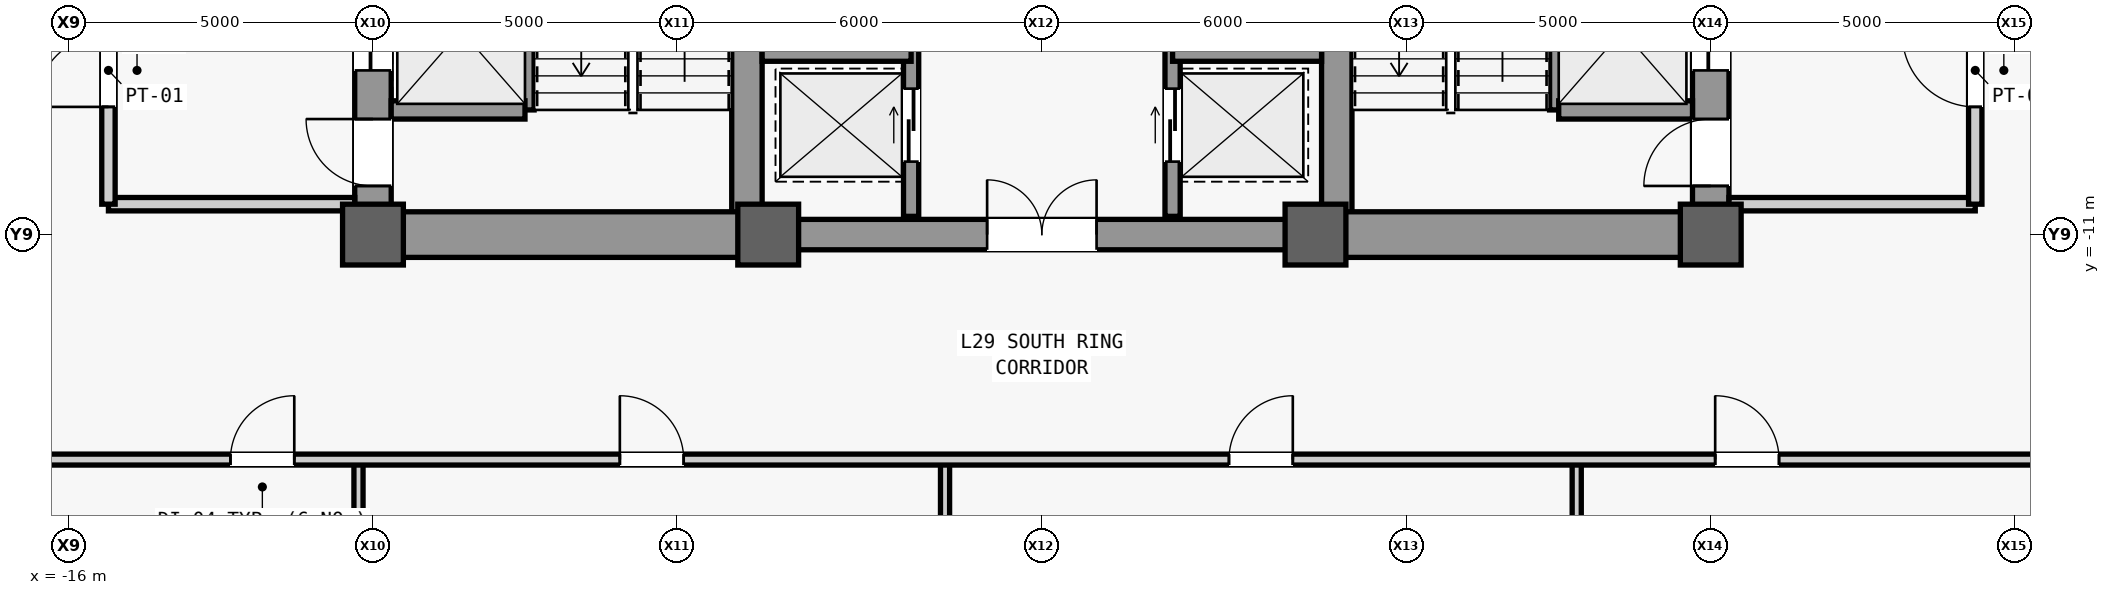
"""IFC4 building model, lengths in metres.
Left out: names, types, materials, properties, quantities, classifications, styles, units other than length and angle.
Written with IfcOpenShell. Run it as: python <this file> out.ifc"""

import sys

from ifc_helpers import new_model, si_unit, direction, frame, frame_2d, origin, origin_2d, place, context, subcontext, project, spatial, rectangle, extrude, source, transform, mapped, element, fill, save


model = new_model("IFC4")
c1 = context("Model", 3, precision=1e-05, world=origin(), true_north=direction((0.0, 1.0)))
c2 = subcontext(c1, "Body", "Model", "MODEL_VIEW")
j1 = project(units=[si_unit("LENGTHUNIT", "METRE"), si_unit("PLANEANGLEUNIT", "RADIAN")], contexts=[c1])
p1 = place(None, origin())
s1 = spatial("IfcSite", under=j1, at=p1, CompositionType="ELEMENT")
p2 = place(p1, origin())
s2 = spatial("IfcBuilding", under=s1, at=p2, CompositionType="ELEMENT")
p3 = place(p2, frame((0.0, 0.0, 128.3)))
s3 = spatial("IfcBuildingStorey", under=s2, at=p3, CompositionType="ELEMENT", Elevation=128.3)
m1 = source(origin(), c2, "Body", "SweptSolid", [
    extrude(rectangle(XDim=22.0, YDim=0.6, at=frame_2d((11.0, 0.0))), origin(), (0.0, 0.0, 1.0), 3.84),
])
p4 = place(p3, frame((-11.0, -11.0, 0.0), z_axis=(0.0, 0.0, 1.0), x_axis=(0.0, 1.0, 0.0)))
e1 = element("IfcWall", 1, at=p4, inside=s3, PredefinedType="SHEAR", context=c2, shape_type="MappedRepresentation", body=[
    mapped(m1, transform((0.0, 0.0, 0.0), scale=1.0)),
])
m2 = source(origin(), c2, "Body", "SweptSolid", [
    extrude(rectangle(XDim=1.1, YDim=2.2, at=frame_2d((0.55, 1.1))), frame((0.0, 0.31, 0.0), z_axis=(0.0, -1.0, 0.0), x_axis=(1.0, 0.0, 0.0)), (0.0, 0.0, 1.0), 0.62),
])
p5 = place(p4, frame((0.8, 0.0, 0.0)))
e2 = element("IfcOpeningElement", 2, at=p5, cuts=e1, PredefinedType="OPENING", context=c2, shape_type="MappedRepresentation", body=[
    mapped(m2, transform((0.0, 0.0, 0.0), scale=1.0)),
])
p6 = place(p4, frame((12.5, 0.0, 0.0)))
e3 = element("IfcOpeningElement", 3, at=p6, cuts=e1, PredefinedType="OPENING", context=c2, shape_type="MappedRepresentation", body=[
    mapped(m2, transform((0.0, 0.0, 0.0), scale=1.0)),
])
m3 = source(origin(), c2, "Body", "SweptSolid", [
    extrude(rectangle(XDim=0.9, YDim=2.15, at=frame_2d((0.45, 1.075))), frame((0.0, 0.31, 0.0), z_axis=(0.0, -1.0, 0.0), x_axis=(1.0, 0.0, 0.0)), (0.0, 0.0, 1.0), 0.62),
])
p7 = place(p4, frame((6.85, 0.0, 0.0)))
e4 = element("IfcOpeningElement", 4, at=p7, cuts=e1, PredefinedType="OPENING", context=c2, shape_type="MappedRepresentation", body=[
    mapped(m3, transform((0.0, 0.0, 0.0), scale=1.0)),
])
m4 = source(origin(), c2, "Body", "SweptSolid", [
    extrude(rectangle(XDim=1.3, YDim=2.3, at=frame_2d((0.65, 1.15))), frame((0.0, 0.31, 0.0), z_axis=(0.0, -1.0, 0.0), x_axis=(1.0, 0.0, 0.0)), (0.0, 0.0, 1.0), 0.62),
])
p8 = place(p4, frame((2.7, 0.0, 0.0)))
e5 = element("IfcOpeningElement", 5, at=p8, cuts=e1, PredefinedType="OPENING", context=c2, shape_type="MappedRepresentation", body=[
    mapped(m4, transform((0.0, 0.0, 0.0), scale=1.0)),
])
p9 = place(p3, frame((11.0, -11.0, 0.0), z_axis=(0.0, 0.0, 1.0), x_axis=(0.0, 1.0, 0.0)))
e6 = element("IfcWall", 6, at=p9, inside=s3, PredefinedType="SHEAR", context=c2, shape_type="MappedRepresentation", body=[
    mapped(m1, transform((0.0, 0.0, 0.0), scale=1.0)),
])
p10 = place(p9, frame((0.8, 0.0, 0.0)))
e7 = element("IfcOpeningElement", 7, at=p10, cuts=e6, PredefinedType="OPENING", context=c2, shape_type="MappedRepresentation", body=[
    mapped(m2, transform((0.0, 0.0, 0.0), scale=1.0)),
])
p11 = place(p9, frame((6.2, 0.0, 0.0)))
e8 = element("IfcOpeningElement", 8, at=p11, cuts=e6, PredefinedType="OPENING", context=c2, shape_type="MappedRepresentation", body=[
    mapped(m3, transform((0.0, 0.0, 0.0), scale=1.0)),
])
p12 = place(p9, frame((8.05, 0.0, 0.0)))
e9 = element("IfcOpeningElement", 9, at=p12, cuts=e6, PredefinedType="OPENING", context=c2, shape_type="MappedRepresentation", body=[
    mapped(m3, transform((0.0, 0.0, 0.0), scale=1.0)),
])
p13 = place(p9, frame((2.7, 0.0, 0.0)))
e10 = element("IfcOpeningElement", 10, at=p13, cuts=e6, PredefinedType="OPENING", context=c2, shape_type="MappedRepresentation", body=[
    mapped(m4, transform((0.0, 0.0, 0.0), scale=1.0)),
])
p14 = place(p9, frame((13.35, 0.0, 0.0)))
e11 = element("IfcOpeningElement", 11, at=p14, cuts=e6, PredefinedType="OPENING", context=c2, shape_type="MappedRepresentation", body=[
    mapped(m4, transform((0.0, 0.0, 0.0), scale=1.0)),
])
m5 = source(origin(), c2, "Body", "SweptSolid", [
    extrude(rectangle(XDim=21.4, YDim=0.5, at=frame_2d((10.7, 0.0))), origin(), (0.0, 0.0, 1.0), 3.84),
])
for number, where, z_axis, x_axis in (
    (12, (-4.85, -10.7, 0.0), (0.0, 0.0, 1.0), (0.0, 1.0, 0.0)),
    (13, (4.85, -10.7, 0.0), (0.0, 0.0, 1.0), (0.0, 1.0, 0.0)),
):
    element("IfcWall", number, at=place(p3, frame(where, z_axis=z_axis, x_axis=x_axis)), inside=s3, PredefinedType="SHEAR", context=c2, shape_type="MappedRepresentation", body=[
        mapped(m5, transform((0.0, 0.0, 0.0), scale=1.0)),
    ])
m6 = source(origin(), c2, "Body", "SweptSolid", [
    extrude(rectangle(XDim=5.85, YDim=0.75, at=frame_2d((2.925, 0.0))), origin(), (0.0, 0.0, 1.0), 3.84),
])
for number, where, z_axis, x_axis in (
    (14, (-10.7, -11.0, 0.0), (0.0, 0.0, 1.0), (1.0, 0.0, 0.0)),
    (15, (4.85, -11.0, 0.0), (0.0, 0.0, 1.0), (1.0, 0.0, 0.0)),
):
    element("IfcWall", number, at=place(p3, frame(where, z_axis=z_axis, x_axis=x_axis)), inside=s3, PredefinedType="SHEAR", context=c2, shape_type="MappedRepresentation", body=[
        mapped(m6, transform((0.0, 0.0, 0.0), scale=1.0)),
    ])
m7 = source(origin(), c2, "Body", "SweptSolid", [
    extrude(rectangle(XDim=9.2, YDim=0.5, at=frame_2d((4.6, 0.0))), origin(), (0.0, 0.0, 1.0), 3.84),
])
p15 = place(p3, frame((-4.6, -11.0, 0.0), z_axis=(0.0, 0.0, 1.0), x_axis=(1.0, 0.0, 0.0)))
e16 = element("IfcWall", 16, at=p15, inside=s3, PredefinedType="SHEAR", context=c2, shape_type="MappedRepresentation", body=[
    mapped(m7, transform((0.0, 0.0, 0.0), scale=1.0)),
])
m8 = source(origin(), c2, "Body", "SweptSolid", [
    extrude(rectangle(XDim=1.8, YDim=2.25, at=frame_2d((0.9, 1.125))), frame((0.0, 0.26, 0.0), z_axis=(0.0, -1.0, 0.0), x_axis=(1.0, 0.0, 0.0)), (0.0, 0.0, 1.0), 0.52),
])
p16 = place(p15, frame((3.7, 0.0, 0.0)))
e17 = element("IfcOpeningElement", 17, at=p16, cuts=e16, PredefinedType="OPENING", context=c2, shape_type="MappedRepresentation", body=[
    mapped(m8, transform((0.0, 0.0, 0.0), scale=1.0)),
])
m9 = source(origin(), c2, "Body", "SweptSolid", [
    extrude(rectangle(XDim=1.0, YDim=1.0, at=origin_2d()), origin(), (0.0, 0.0, 1.0), 4.1),
])
for number, where, z_axis, x_axis in (
    (18, (-11.0, -11.0, 0.0), (0.0, 0.0, 1.0), (1.0, 0.0, 0.0)),
    (19, (-4.5, -11.0, 0.0), (0.0, 0.0, 1.0), (1.0, 0.0, 0.0)),
    (20, (4.5, -11.0, 0.0), (0.0, 0.0, 1.0), (1.0, 0.0, 0.0)),
    (21, (11.0, -11.0, 0.0), (0.0, 0.0, 1.0), (1.0, 0.0, 0.0)),
):
    element("IfcColumn", number, at=place(p3, frame(where, z_axis=z_axis, x_axis=x_axis)), inside=s3, PredefinedType="COLUMN", context=c2, shape_type="MappedRepresentation", body=[
        mapped(m9, transform((0.0, 0.0, 0.0), scale=1.0)),
    ])
m10 = source(origin(), c2, "Body", "SweptSolid", [
    extrude(rectangle(XDim=7.8, YDim=0.3, at=frame_2d((3.9, 0.0))), origin(), (0.0, 0.0, 1.0), 3.84),
])
p17 = place(p3, frame((-8.5, -8.95, 0.0), z_axis=(0.0, 0.0, 1.0), x_axis=(0.0, 1.0, 0.0)))
e22 = element("IfcWall", 22, at=p17, inside=s3, PredefinedType="SHEAR", context=c2, shape_type="MappedRepresentation", body=[
    mapped(m10, transform((0.0, 0.0, 0.0), scale=1.0)),
])
m11 = source(origin(), c2, "Body", "SweptSolid", [
    extrude(rectangle(XDim=2.2, YDim=0.3, at=frame_2d((1.1, 0.0))), origin(), (0.0, 0.0, 1.0), 3.84),
])
p18 = place(p3, frame((-10.7, -8.95, 0.0), z_axis=(0.0, 0.0, 1.0), x_axis=(1.0, 0.0, 0.0)))
e23 = element("IfcWall", 23, at=p18, inside=s3, PredefinedType="SHEAR", context=c2, shape_type="MappedRepresentation", body=[
    mapped(m11, transform((0.0, 0.0, 0.0), scale=1.0)),
])
p19 = place(p3, frame((8.5, -8.95, 0.0), z_axis=(0.0, 0.0, 1.0), x_axis=(0.0, 1.0, 0.0)))
e24 = element("IfcWall", 24, at=p19, inside=s3, PredefinedType="SHEAR", context=c2, shape_type="MappedRepresentation", body=[
    mapped(m10, transform((0.0, 0.0, 0.0), scale=1.0)),
])
p20 = place(p3, frame((8.5, -8.95, 0.0), z_axis=(0.0, 0.0, 1.0), x_axis=(1.0, 0.0, 0.0)))
e25 = element("IfcWall", 25, at=p20, inside=s3, PredefinedType="SHEAR", context=c2, shape_type="MappedRepresentation", body=[
    mapped(m11, transform((0.0, 0.0, 0.0), scale=1.0)),
])
m12 = source(origin(), c2, "Body", "SweptSolid", [
    extrude(rectangle(XDim=4.05, YDim=0.22, at=frame_2d((2.025, 0.0))), origin(), (0.0, 0.0, 1.0), 3.84),
])
p21 = place(p3, frame((-15.35, -10.5, 0.0), z_axis=(0.0, 0.0, 1.0), x_axis=(1.0, 0.0, 0.0)))
e26 = element("IfcWall", 26, at=p21, inside=s3, PredefinedType="PARTITIONING", context=c2, shape_type="MappedRepresentation", body=[
    mapped(m12, transform((0.0, 0.0, 0.0), scale=1.0)),
])
m13 = source(origin(), c2, "Body", "SweptSolid", [
    extrude(rectangle(XDim=4.4, YDim=0.22, at=frame_2d((2.2, 0.0))), origin(), (0.0, 0.0, 1.0), 3.84),
])
p22 = place(p3, frame((-15.35, -10.5, 0.0), z_axis=(0.0, 0.0, 1.0), x_axis=(0.0, 1.0, 0.0)))
e27 = element("IfcWall", 27, at=p22, inside=s3, PredefinedType="PARTITIONING", context=c2, shape_type="MappedRepresentation", body=[
    mapped(m13, transform((0.0, 0.0, 0.0), scale=1.0)),
])
m14 = source(origin(), c2, "Body", "SweptSolid", [
    extrude(rectangle(XDim=1.2, YDim=2.2, at=frame_2d((0.6, 1.1))), frame((0.0, 0.12, 0.0), z_axis=(0.0, -1.0, 0.0), x_axis=(1.0, 0.0, 0.0)), (0.0, 0.0, 1.0), 0.24),
])
p23 = place(p22, frame((1.6, 0.0, 0.0)))
e28 = element("IfcOpeningElement", 28, at=p23, cuts=e27, PredefinedType="OPENING", context=c2, shape_type="MappedRepresentation", body=[
    mapped(m14, transform((0.0, 0.0, 0.0), scale=1.0)),
])
p24 = place(p3, frame((11.3, -10.5, 0.0), z_axis=(0.0, 0.0, 1.0), x_axis=(1.0, 0.0, 0.0)))
e29 = element("IfcWall", 29, at=p24, inside=s3, PredefinedType="PARTITIONING", context=c2, shape_type="MappedRepresentation", body=[
    mapped(m12, transform((0.0, 0.0, 0.0), scale=1.0)),
])
p25 = place(p3, frame((15.35, -10.5, 0.0), z_axis=(0.0, 0.0, 1.0), x_axis=(0.0, 1.0, 0.0)))
e30 = element("IfcWall", 30, at=p25, inside=s3, PredefinedType="PARTITIONING", context=c2, shape_type="MappedRepresentation", body=[
    mapped(m13, transform((0.0, 0.0, 0.0), scale=1.0)),
])
p26 = place(p25, frame((1.6, 0.0, 0.0)))
e31 = element("IfcOpeningElement", 31, at=p26, cuts=e30, PredefinedType="OPENING", context=c2, shape_type="MappedRepresentation", body=[
    mapped(m14, transform((0.0, 0.0, 0.0), scale=1.0)),
])
m15 = source(origin(), c2, "Body", "SweptSolid", [
    extrude(rectangle(XDim=5.4, YDim=0.25, at=frame_2d((2.7, 0.0))), origin(), (0.0, 0.0, 1.0), 3.84),
])
p27 = place(p3, frame((-2.15, -10.7, 0.0), z_axis=(0.0, 0.0, 1.0), x_axis=(0.0, 1.0, 0.0)))
e32 = element("IfcWall", 32, at=p27, inside=s3, PredefinedType="SHEAR", context=c2, shape_type="MappedRepresentation", body=[
    mapped(m15, transform((0.0, 0.0, 0.0), scale=1.0)),
])
m16 = source(origin(), c2, "Body", "SweptSolid", [
    extrude(rectangle(XDim=1.2, YDim=2.3, at=frame_2d((0.6, 1.15))), frame((0.0, 0.135, 0.0), z_axis=(0.0, -1.0, 0.0), x_axis=(1.0, 0.0, 0.0)), (0.0, 0.0, 1.0), 0.27),
])
p28 = place(p27, frame((0.9, 0.0, 0.0)))
e33 = element("IfcOpeningElement", 33, at=p28, cuts=e32, PredefinedType="OPENING", context=c2, shape_type="MappedRepresentation", body=[
    mapped(m16, transform((0.0, 0.0, 0.0), scale=1.0)),
])
p29 = place(p27, frame((3.2, 0.0, 0.0)))
e34 = element("IfcOpeningElement", 34, at=p29, cuts=e32, PredefinedType="OPENING", context=c2, shape_type="MappedRepresentation", body=[
    mapped(m16, transform((0.0, 0.0, 0.0), scale=1.0)),
])
p30 = place(p3, frame((2.15, -10.7, 0.0), z_axis=(0.0, 0.0, 1.0), x_axis=(0.0, 1.0, 0.0)))
e35 = element("IfcWall", 35, at=p30, inside=s3, PredefinedType="SHEAR", context=c2, shape_type="MappedRepresentation", body=[
    mapped(m15, transform((0.0, 0.0, 0.0), scale=1.0)),
])
p31 = place(p30, frame((0.9, 0.0, 0.0)))
e36 = element("IfcOpeningElement", 36, at=p31, cuts=e35, PredefinedType="OPENING", context=c2, shape_type="MappedRepresentation", body=[
    mapped(m16, transform((0.0, 0.0, 0.0), scale=1.0)),
])
p32 = place(p30, frame((3.2, 0.0, 0.0)))
e37 = element("IfcOpeningElement", 37, at=p32, cuts=e35, PredefinedType="OPENING", context=c2, shape_type="MappedRepresentation", body=[
    mapped(m16, transform((0.0, 0.0, 0.0), scale=1.0)),
])
m17 = source(origin(), c2, "Body", "SweptSolid", [
    extrude(rectangle(XDim=2.45, YDim=0.2, at=frame_2d((1.225, 0.0))), origin(), (0.0, 0.0, 1.0), 3.84),
])
for number, where, z_axis, x_axis in (
    (38, (-4.6, -8.05, 0.0), (0.0, 0.0, 1.0), (1.0, 0.0, 0.0)),
    (39, (2.15, -8.05, 0.0), (0.0, 0.0, 1.0), (1.0, 0.0, 0.0)),
):
    element("IfcWall", number, at=place(p3, frame(where, z_axis=z_axis, x_axis=x_axis)), inside=s3, PredefinedType="SHEAR", context=c2, shape_type="MappedRepresentation", body=[
        mapped(m17, transform((0.0, 0.0, 0.0), scale=1.0)),
    ])
m18 = source(origin(), c2, "Body", "SweptSolid", [
    extrude(rectangle(XDim=17.3, YDim=0.15, at=frame_2d((8.65, 0.0))), origin(), (0.0, 0.0, 1.0), 3.067),
])
p33 = place(p3, frame((-11.238, -32.0, 0.0), z_axis=(0.0, 0.0, 1.0), x_axis=(0.0, 1.0, 0.0)))
e40 = element("IfcWall", 40, at=p33, inside=s3, PredefinedType="PARTITIONING", context=c2, shape_type="MappedRepresentation", body=[
    mapped(m18, transform((0.0, 0.0, 0.0), scale=1.0)),
])
m19 = source(origin(), c2, "Body", "SweptSolid", [
    extrude(rectangle(XDim=17.3, YDim=0.15, at=frame_2d((8.65, 0.0))), origin(), (0.0, 0.0, 1.0), 3.84),
])
for number, where, z_axis, x_axis in (
    (41, (-1.592, -32.0, 0.0), (0.0, 0.0, 1.0), (0.0, 1.0, 0.0)),
    (42, (8.796, -32.0, 0.0), (0.0, 0.0, 1.0), (0.0, 1.0, 0.0)),
):
    element("IfcWall", number, at=place(p3, frame(where, z_axis=z_axis, x_axis=x_axis)), inside=s3, PredefinedType="PARTITIONING", context=c2, shape_type="MappedRepresentation", body=[
        mapped(m19, transform((0.0, 0.0, 0.0), scale=1.0)),
    ])
m20 = source(origin(), c2, "Body", "SweptSolid", [
    extrude(rectangle(XDim=37.1, YDim=0.18, at=frame_2d((18.55, 0.0))), origin(), (0.0, 0.0, 1.0), 3.84),
])
p34 = place(p3, frame((-19.4, -14.7, 0.0), z_axis=(0.0, 0.0, 1.0), x_axis=(1.0, 0.0, 0.0)))
e43 = element("IfcWall", 43, at=p34, inside=s3, PredefinedType="PARTITIONING", context=c2, shape_type="MappedRepresentation", body=[
    mapped(m20, transform((0.0, 0.0, 0.0), scale=1.0)),
])
m21 = source(origin(), c2, "Body", "SweptSolid", [
    extrude(rectangle(XDim=1.05, YDim=2.2, at=frame_2d((0.525, 1.1))), frame((0.0, 0.1, 0.0), z_axis=(0.0, -1.0, 0.0), x_axis=(1.0, 0.0, 0.0)), (0.0, 0.0, 1.0), 0.2),
])
p35 = place(p34, frame((6.056, 0.0, 0.0)))
e44 = element("IfcOpeningElement", 44, at=p35, cuts=e43, PredefinedType="OPENING", context=c2, shape_type="MappedRepresentation", body=[
    mapped(m21, transform((0.0, 0.0, 0.0), scale=1.0)),
])
p36 = place(p34, frame((12.46, 0.0, 0.0)))
e45 = element("IfcOpeningElement", 45, at=p36, cuts=e43, PredefinedType="OPENING", context=c2, shape_type="MappedRepresentation", body=[
    mapped(m21, transform((0.0, 0.0, 0.0), scale=1.0)),
])
p37 = place(p34, frame((22.477, 0.0, 0.0)))
e46 = element("IfcOpeningElement", 46, at=p37, cuts=e43, PredefinedType="OPENING", context=c2, shape_type="MappedRepresentation", body=[
    mapped(m21, transform((0.0, 0.0, 0.0), scale=1.0)),
])
p38 = place(p34, frame((30.473, 0.0, 0.0)))
e47 = element("IfcOpeningElement", 47, at=p38, cuts=e43, PredefinedType="OPENING", context=c2, shape_type="MappedRepresentation", body=[
    mapped(m21, transform((0.0, 0.0, 0.0), scale=1.0)),
])
m22 = source(origin(), c2, "Body", "SweptSolid", [
    extrude(rectangle(XDim=1.1, YDim=2.2, at=frame_2d((0.55, 1.1))), frame((0.0, 0.025, 0.0), z_axis=(0.0, -1.0, 0.0), x_axis=(1.0, 0.0, 0.0)), (0.0, 0.0, 1.0), 0.05),
])
p39 = place(p5, origin())
e48 = element("IfcDoor", 48, at=p39, inside=s3, OperationType="SINGLE_SWING_RIGHT", PredefinedType="DOOR", context=c2, shape_type="MappedRepresentation", body=[
    mapped(m22, transform((0.0, 0.0, 0.0), scale=1.0)),
])
fill(e2, e48)
p40 = place(p10, origin())
e49 = element("IfcDoor", 49, at=p40, inside=s3, OperationType="SINGLE_SWING_LEFT", PredefinedType="DOOR", context=c2, shape_type="MappedRepresentation", body=[
    mapped(m22, transform((0.0, 0.0, 0.0), scale=1.0)),
])
fill(e7, e49)
m23 = source(origin(), c2, "Body", "SweptSolid", [
    extrude(rectangle(XDim=1.2, YDim=2.2, at=frame_2d((0.6, 1.1))), frame((0.0, 0.025, 0.0), z_axis=(0.0, -1.0, 0.0), x_axis=(1.0, 0.0, 0.0)), (0.0, 0.0, 1.0), 0.05),
])
p41 = place(p23, origin())
e50 = element("IfcDoor", 50, at=p41, inside=s3, OperationType="SINGLE_SWING_LEFT", PredefinedType="DOOR", context=c2, shape_type="MappedRepresentation", body=[
    mapped(m23, transform((0.0, 0.0, 0.0), scale=1.0)),
])
fill(e28, e50)
p42 = place(p26, origin())
e51 = element("IfcDoor", 51, at=p42, inside=s3, OperationType="SINGLE_SWING_RIGHT", PredefinedType="DOOR", context=c2, shape_type="MappedRepresentation", body=[
    mapped(m23, transform((0.0, 0.0, 0.0), scale=1.0)),
])
fill(e31, e51)
m24 = source(origin(), c2, "Body", "SweptSolid", [
    extrude(rectangle(XDim=1.8, YDim=2.25, at=frame_2d((0.9, 1.125))), frame((0.0, 0.025, 0.0), z_axis=(0.0, -1.0, 0.0), x_axis=(1.0, 0.0, 0.0)), (0.0, 0.0, 1.0), 0.05),
])
p43 = place(p16, origin())
e52 = element("IfcDoor", 52, at=p43, inside=s3, OperationType="SINGLE_SWING_LEFT", PredefinedType="DOOR", context=c2, shape_type="MappedRepresentation", body=[
    mapped(m24, transform((0.0, 0.0, 0.0), scale=1.0)),
])
fill(e17, e52)
m25 = source(origin(), c2, "Body", "SweptSolid", [
    extrude(rectangle(XDim=1.05, YDim=2.2, at=frame_2d((0.525, 1.1))), frame((0.0, 0.025, 0.0), z_axis=(0.0, -1.0, 0.0), x_axis=(1.0, 0.0, 0.0)), (0.0, 0.0, 1.0), 0.05),
])
p44 = place(p35, origin())
e53 = element("IfcDoor", 53, at=p44, inside=s3, OperationType="SINGLE_SWING_RIGHT", PredefinedType="DOOR", context=c2, shape_type="MappedRepresentation", body=[
    mapped(m25, transform((0.0, 0.0, 0.0), scale=1.0)),
])
fill(e44, e53)
p45 = place(p36, origin())
e54 = element("IfcDoor", 54, at=p45, inside=s3, OperationType="SINGLE_SWING_LEFT", PredefinedType="DOOR", context=c2, shape_type="MappedRepresentation", body=[
    mapped(m25, transform((0.0, 0.0, 0.0), scale=1.0)),
])
fill(e45, e54)
p46 = place(p37, origin())
e55 = element("IfcDoor", 55, at=p46, inside=s3, OperationType="SINGLE_SWING_RIGHT", PredefinedType="DOOR", context=c2, shape_type="MappedRepresentation", body=[
    mapped(m25, transform((0.0, 0.0, 0.0), scale=1.0)),
])
fill(e46, e55)
p47 = place(p38, origin())
e56 = element("IfcDoor", 56, at=p47, inside=s3, OperationType="SINGLE_SWING_LEFT", PredefinedType="DOOR", context=c2, shape_type="MappedRepresentation", body=[
    mapped(m25, transform((0.0, 0.0, 0.0), scale=1.0)),
])
fill(e47, e56)
m26 = source(origin(), c2, "Body", "SweptSolid", [
    extrude(rectangle(XDim=1.2, YDim=2.3, at=frame_2d((0.6, 1.15))), frame((0.0, 0.025, 0.0), z_axis=(0.0, -1.0, 0.0), x_axis=(1.0, 0.0, 0.0)), (0.0, 0.0, 1.0), 0.05),
])
p48 = place(p28, origin())
e57 = element("IfcDoor", 57, at=p48, inside=s3, OperationType="SLIDING_TO_LEFT", PredefinedType="DOOR", context=c2, shape_type="MappedRepresentation", body=[
    mapped(m26, transform((0.0, 0.0, 0.0), scale=1.0)),
])
fill(e33, e57)
p49 = place(p31, origin())
e58 = element("IfcDoor", 58, at=p49, inside=s3, OperationType="SLIDING_TO_LEFT", PredefinedType="DOOR", context=c2, shape_type="MappedRepresentation", body=[
    mapped(m26, transform((0.0, 0.0, 0.0), scale=1.0)),
])
fill(e36, e58)
m27 = source(origin(), c2, "Body", "SweptSolid", [
    extrude(rectangle(XDim=1.3, YDim=2.3, at=frame_2d((0.65, 1.15))), frame((0.0, 0.025, 0.0), z_axis=(0.0, -1.0, 0.0), x_axis=(1.0, 0.0, 0.0)), (0.0, 0.0, 1.0), 0.05),
])
p50 = place(p8, origin())
e59 = element("IfcDoor", 59, at=p50, inside=s3, OperationType="SLIDING_TO_LEFT", PredefinedType="DOOR", context=c2, shape_type="MappedRepresentation", body=[
    mapped(m27, transform((0.0, 0.0, 0.0), scale=1.0)),
])
fill(e5, e59)
p51 = place(p13, origin())
e60 = element("IfcDoor", 60, at=p51, inside=s3, OperationType="SLIDING_TO_LEFT", PredefinedType="DOOR", context=c2, shape_type="MappedRepresentation", body=[
    mapped(m27, transform((0.0, 0.0, 0.0), scale=1.0)),
])
fill(e10, e60)
save(model, sys.argv[1])
